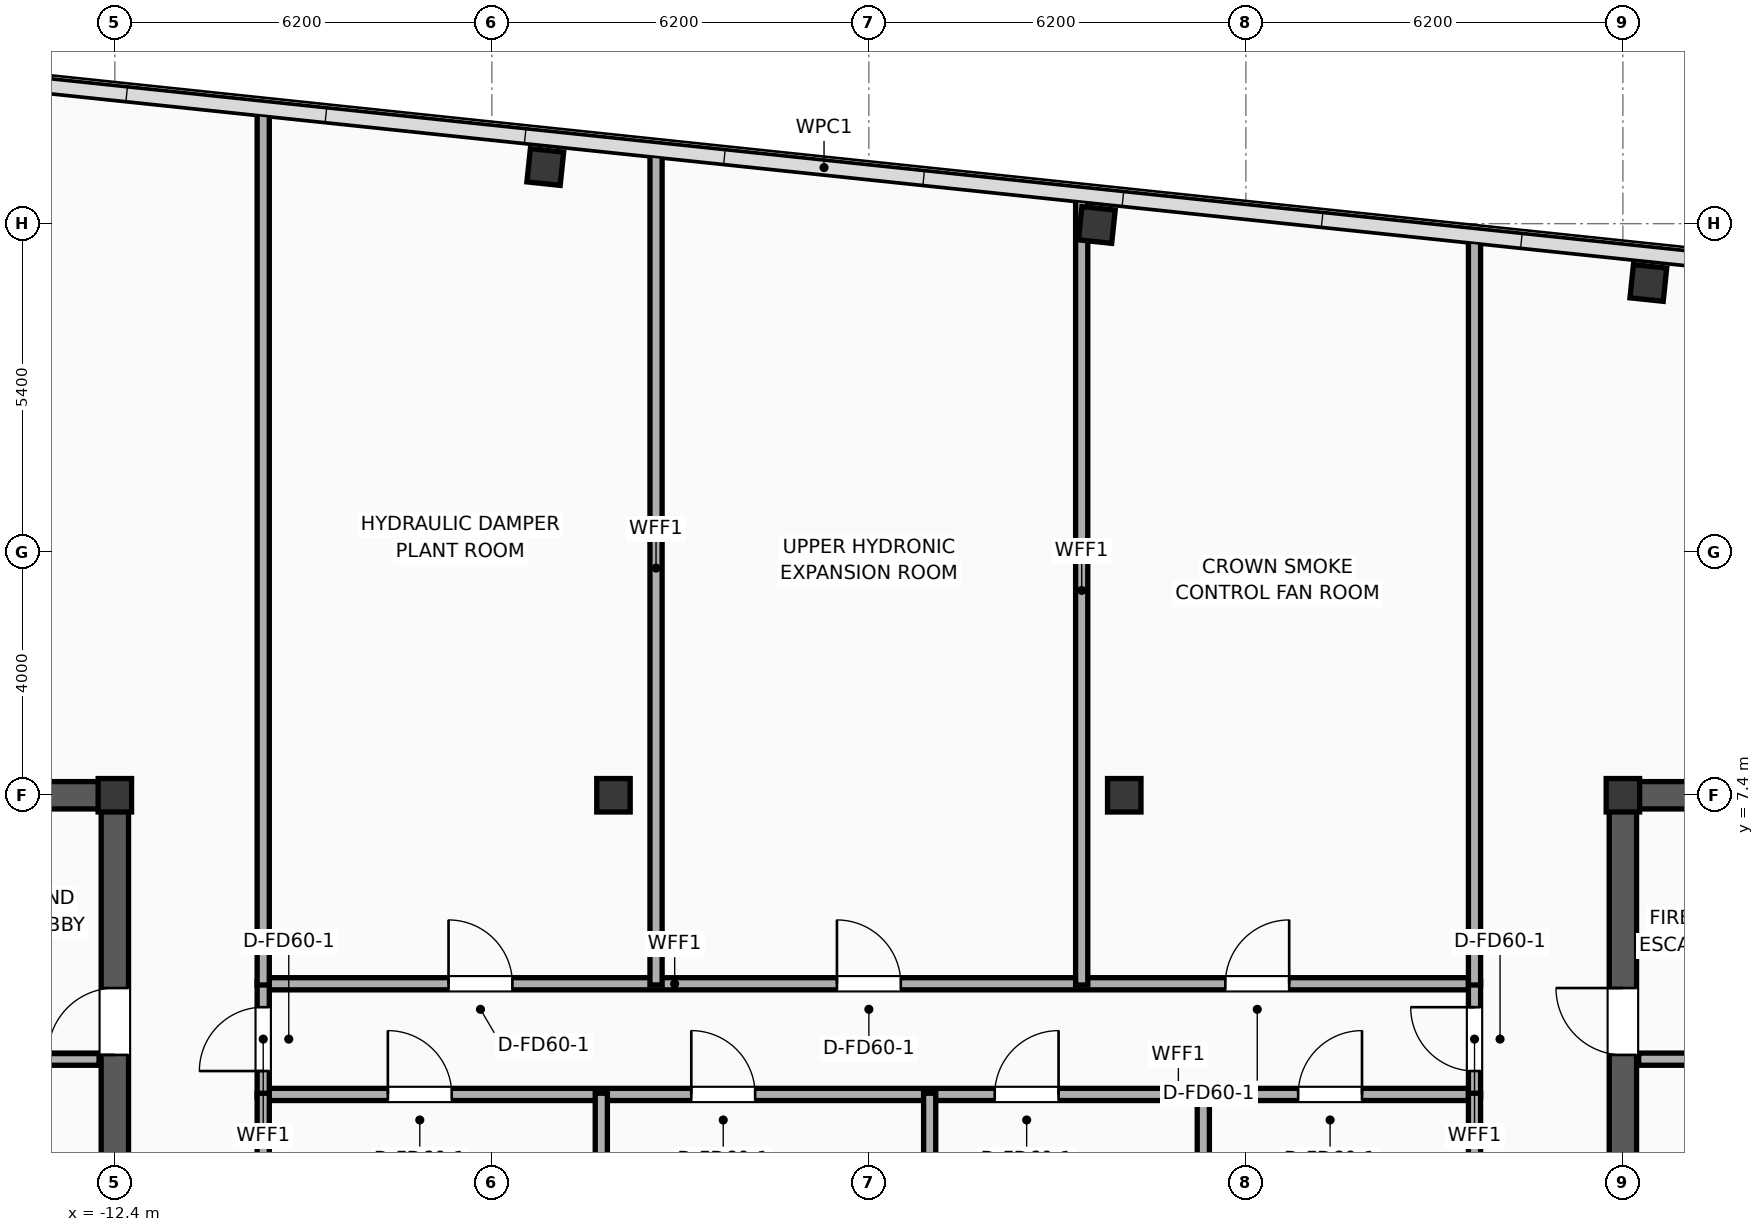
"""IFC4 building model, lengths in metres.
Left out: names, types, materials, properties, quantities, classifications, styles, units other than length and angle.
Written with IfcOpenShell. Run it as: python <this file> out.ifc"""

import sys

from ifc_helpers import new_model, si_unit, direction, frame, frame_2d, origin, origin_2d, place, context, subcontext, project, spatial, rectangle, hollow_rectangle, extrude, element, fill, save


model = new_model("IFC4")
c1 = context("Model", 3, precision=1e-05, world=origin(), true_north=direction((0.0, 1.0)))
c2 = subcontext(c1, "Body", "Model", "MODEL_VIEW")
j1 = project(units=[si_unit("LENGTHUNIT", "METRE"), si_unit("PLANEANGLEUNIT", "RADIAN")], contexts=[c1])
p1 = place(None, origin())
s1 = spatial("IfcSite", under=j1, at=p1, CompositionType="ELEMENT")
p2 = place(p1, origin())
s2 = spatial("IfcBuilding", under=s1, at=p2, CompositionType="ELEMENT")
p3 = place(p2, frame((0.0, 0.0, 326.6)))
s3 = spatial("IfcBuildingStorey", under=s2, at=p3, CompositionType="ELEMENT", Elevation=326.6)
for number, where, z_axis, x_axis in (
    (1, (-12.4, 7.4, 0.0), (0.0, 0.0, 1.0), (1.0, 0.0, 0.0)),
    (2, (12.4, 7.4, 0.0), (0.0, 0.0, 1.0), (1.0, 0.0, 0.0)),
):
    element("IfcColumn", number, at=place(p3, frame(where, z_axis=z_axis, x_axis=x_axis)), inside=s3, PredefinedType="COLUMN", context=c2, shape_type="SweptSolid", body=[
        extrude(hollow_rectangle(XDim=0.55, YDim=0.55, WallThickness=0.022, at=origin_2d()), origin(), (0.0, 0.0, 1.0), 5.3),
    ])
p4 = place(p3, frame((-19.425, 7.4, 0.0), z_axis=(0.0, 0.0, 1.0), x_axis=(1.0, 0.0, 0.0)))
e3 = element("IfcWall", 3, at=p4, inside=s3, PredefinedType="SHEAR", context=c2, shape_type="SweptSolid", body=[
    extrude(rectangle(XDim=7.25, YDim=0.45, at=frame_2d((3.625, 0.0))), origin(), (0.0, 0.0, 1.0), 5.025),
])
p5 = place(p3, frame((-12.4, -7.4, 0.0), z_axis=(0.0, 0.0, 1.0), x_axis=(0.0, 1.0, 0.0)))
e4 = element("IfcWall", 4, at=p5, inside=s3, PredefinedType="SHEAR", context=c2, shape_type="SweptSolid", body=[
    extrude(rectangle(XDim=14.8, YDim=0.45, at=frame_2d((7.4, 0.0))), origin(), (0.0, 0.0, 1.0), 5.025),
])
p6 = place(p5, frame((10.53, 0.0, 0.0)))
e5 = element("IfcOpeningElement", 5, at=p6, cuts=e4, PredefinedType="OPENING", context=c2, shape_type="SweptSolid", body=[
    extrude(rectangle(XDim=1.1, YDim=2.05, at=frame_2d((0.55, 1.025))), frame((0.0, 0.235, 0.0), z_axis=(0.0, -1.0, 0.0), x_axis=(1.0, 0.0, 0.0)), (0.0, 0.0, 1.0), 0.47),
])
p7 = place(p5, frame((4.45, 0.0, 0.0)))
e6 = element("IfcOpeningElement", 6, at=p7, cuts=e4, PredefinedType="OPENING", context=c2, shape_type="SweptSolid", body=[
    extrude(rectangle(XDim=0.9, YDim=2.05, at=frame_2d((0.45, 1.025))), frame((0.0, 0.235, 0.0), z_axis=(0.0, -1.0, 0.0), x_axis=(1.0, 0.0, 0.0)), (0.0, 0.0, 1.0), 0.47),
])
p8 = place(p3, frame((12.175, 7.4, 0.0), z_axis=(0.0, 0.0, 1.0), x_axis=(1.0, 0.0, 0.0)))
e7 = element("IfcWall", 7, at=p8, inside=s3, PredefinedType="SHEAR", context=c2, shape_type="SweptSolid", body=[
    extrude(rectangle(XDim=7.25, YDim=0.45, at=frame_2d((3.625, 0.0))), origin(), (0.0, 0.0, 1.0), 5.025),
])
p9 = place(p3, frame((12.4, -7.4, 0.0), z_axis=(0.0, 0.0, 1.0), x_axis=(0.0, 1.0, 0.0)))
e8 = element("IfcWall", 8, at=p9, inside=s3, PredefinedType="SHEAR", context=c2, shape_type="SweptSolid", body=[
    extrude(rectangle(XDim=14.8, YDim=0.45, at=frame_2d((7.4, 0.0))), origin(), (0.0, 0.0, 1.0), 5.025),
])
p10 = place(p9, frame((10.53, 0.0, 0.0)))
e9 = element("IfcOpeningElement", 9, at=p10, cuts=e8, PredefinedType="OPENING", context=c2, shape_type="SweptSolid", body=[
    extrude(rectangle(XDim=1.1, YDim=2.05, at=frame_2d((0.55, 1.025))), frame((0.0, 0.235, 0.0), z_axis=(0.0, -1.0, 0.0), x_axis=(1.0, 0.0, 0.0)), (0.0, 0.0, 1.0), 0.47),
])
p11 = place(p9, frame((4.45, 0.0, 0.0)))
e10 = element("IfcOpeningElement", 10, at=p11, cuts=e8, PredefinedType="OPENING", context=c2, shape_type="SweptSolid", body=[
    extrude(rectangle(XDim=0.9, YDim=2.05, at=frame_2d((0.45, 1.025))), frame((0.0, 0.235, 0.0), z_axis=(0.0, -1.0, 0.0), x_axis=(1.0, 0.0, 0.0)), (0.0, 0.0, 1.0), 0.47),
])
for number, where, z_axis, x_axis in (
    (11, (-4.2, 7.4, 0.0), (0.0, 0.0, 1.0), (1.0, 0.0, 0.0)),
    (12, (4.2, 7.4, 0.0), (0.0, 0.0, 1.0), (1.0, 0.0, 0.0)),
    (13, (12.819, 15.825, 0.0), (0.0, 0.0, 1.0), (0.995, -0.105, 0.0)),
    (14, (3.749, 16.778, 0.0), (0.0, 0.0, 1.0), (0.995, -0.105, 0.0)),
    (15, (-5.322, 17.732, 0.0), (0.0, 0.0, 1.0), (0.995, -0.105, 0.0)),
):
    element("IfcColumn", number, at=place(p3, frame(where, z_axis=z_axis, x_axis=x_axis)), inside=s3, PredefinedType="COLUMN", context=c2, shape_type="SweptSolid", body=[
        extrude(hollow_rectangle(XDim=0.55, YDim=0.55, WallThickness=0.022, at=origin_2d()), origin(), (0.0, 0.0, 1.0), 5.3),
    ])
p12 = place(p3, frame((-23.395, 20.104, 0.0), z_axis=(0.0, 0.0, 1.0), x_axis=(0.994522116558, -0.104526358762, 0.0)))
e16 = element("IfcWall", 16, at=p12, inside=s3, PredefinedType="PARAPET", context=c2, shape_type="SweptSolid", body=[
    extrude(rectangle(XDim=45.564, YDim=0.22, at=frame_2d((22.782, 0.0))), origin(), (0.0, 0.0, 1.0), 1.2),
])
for number, where, z_axis, x_axis in (
    (17, (-15.82, 3.06, 0.0), (0.0, 0.0, 1.0), (1.0, 0.0, 0.0)),
    (18, (12.66, 3.06, 0.0), (0.0, 0.0, 1.0), (1.0, 0.0, 0.0)),
):
    element("IfcWall", number, at=place(p3, frame(where, z_axis=z_axis, x_axis=x_axis)), inside=s3, PredefinedType="PARTITIONING", context=c2, shape_type="SweptSolid", body=[
        extrude(rectangle(XDim=3.16, YDim=0.2, at=frame_2d((1.58, 0.0))), origin(), (0.0, 0.0, 1.0), 5.025),
    ])
p13 = place(p3, frame((-9.98, 2.48, 0.0), z_axis=(0.0, 0.0, 1.0), x_axis=(1.0, 0.0, 0.0)))
e19 = element("IfcWall", 19, at=p13, inside=s3, PredefinedType="PARTITIONING", context=c2, shape_type="SweptSolid", body=[
    extrude(rectangle(XDim=19.96, YDim=0.2, at=frame_2d((9.98, 0.0))), origin(), (0.0, 0.0, 1.0), 4.595),
])
p14 = place(p13, frame((2.07, 0.0, 0.0)))
e20 = element("IfcOpeningElement", 20, at=p14, cuts=e19, PredefinedType="OPENING", context=c2, shape_type="SweptSolid", body=[
    extrude(rectangle(XDim=1.05, YDim=2.05, at=frame_2d((0.525, 1.025))), frame((0.0, 0.11, 0.0), z_axis=(0.0, -1.0, 0.0), x_axis=(1.0, 0.0, 0.0)), (0.0, 0.0, 1.0), 0.22),
])
p15 = place(p13, frame((7.06, 0.0, 0.0)))
e21 = element("IfcOpeningElement", 21, at=p15, cuts=e19, PredefinedType="OPENING", context=c2, shape_type="SweptSolid", body=[
    extrude(rectangle(XDim=1.05, YDim=2.05, at=frame_2d((0.525, 1.025))), frame((0.0, 0.11, 0.0), z_axis=(0.0, -1.0, 0.0), x_axis=(1.0, 0.0, 0.0)), (0.0, 0.0, 1.0), 0.22),
])
p16 = place(p13, frame((12.05, 0.0, 0.0)))
e22 = element("IfcOpeningElement", 22, at=p16, cuts=e19, PredefinedType="OPENING", context=c2, shape_type="SweptSolid", body=[
    extrude(rectangle(XDim=1.05, YDim=2.05, at=frame_2d((0.525, 1.025))), frame((0.0, 0.11, 0.0), z_axis=(0.0, -1.0, 0.0), x_axis=(1.0, 0.0, 0.0)), (0.0, 0.0, 1.0), 0.22),
])
p17 = place(p13, frame((17.04, 0.0, 0.0)))
e23 = element("IfcOpeningElement", 23, at=p17, cuts=e19, PredefinedType="OPENING", context=c2, shape_type="SweptSolid", body=[
    extrude(rectangle(XDim=1.05, YDim=2.05, at=frame_2d((0.525, 1.025))), frame((0.0, 0.11, 0.0), z_axis=(0.0, -1.0, 0.0), x_axis=(1.0, 0.0, 0.0)), (0.0, 0.0, 1.0), 0.22),
])
p18 = place(p3, frame((-9.98, 4.3, 0.0), z_axis=(0.0, 0.0, 1.0), x_axis=(1.0, 0.0, 0.0)))
e24 = element("IfcWall", 24, at=p18, inside=s3, PredefinedType="PARTITIONING", context=c2, shape_type="SweptSolid", body=[
    extrude(rectangle(XDim=19.96, YDim=0.2, at=frame_2d((9.98, 0.0))), origin(), (0.0, 0.0, 1.0), 5.025),
])
p19 = place(p18, frame((3.068, 0.0, 0.0)))
e25 = element("IfcOpeningElement", 25, at=p19, cuts=e24, PredefinedType="OPENING", context=c2, shape_type="SweptSolid", body=[
    extrude(rectangle(XDim=1.05, YDim=2.05, at=frame_2d((0.525, 1.025))), frame((0.0, 0.11, 0.0), z_axis=(0.0, -1.0, 0.0), x_axis=(1.0, 0.0, 0.0)), (0.0, 0.0, 1.0), 0.22),
])
p20 = place(p18, frame((9.455, 0.0, 0.0)))
e26 = element("IfcOpeningElement", 26, at=p20, cuts=e24, PredefinedType="OPENING", context=c2, shape_type="SweptSolid", body=[
    extrude(rectangle(XDim=1.05, YDim=2.05, at=frame_2d((0.525, 1.025))), frame((0.0, 0.11, 0.0), z_axis=(0.0, -1.0, 0.0), x_axis=(1.0, 0.0, 0.0)), (0.0, 0.0, 1.0), 0.22),
])
p21 = place(p18, frame((15.842, 0.0, 0.0)))
e27 = element("IfcOpeningElement", 27, at=p21, cuts=e24, PredefinedType="OPENING", context=c2, shape_type="SweptSolid", body=[
    extrude(rectangle(XDim=1.05, YDim=2.05, at=frame_2d((0.525, 1.025))), frame((0.0, 0.11, 0.0), z_axis=(0.0, -1.0, 0.0), x_axis=(1.0, 0.0, 0.0)), (0.0, 0.0, 1.0), 0.22),
])
p22 = place(p3, frame((-9.96, 2.44, 0.0), z_axis=(0.0, 0.0, 1.0), x_axis=(0.0, 1.0, 0.0)))
e28 = element("IfcWall", 28, at=p22, inside=s3, PredefinedType="PARTITIONING", context=c2, shape_type="SweptSolid", body=[
    extrude(rectangle(XDim=1.9, YDim=0.2, at=frame_2d((0.95, 0.0))), origin(), (0.0, 0.0, 1.0), 5.025),
])
p23 = place(p22, frame((0.425, 0.0, 0.0)))
e29 = element("IfcOpeningElement", 29, at=p23, cuts=e28, PredefinedType="OPENING", context=c2, shape_type="SweptSolid", body=[
    extrude(rectangle(XDim=1.05, YDim=2.05, at=frame_2d((0.525, 1.025))), frame((0.0, 0.11, 0.0), z_axis=(0.0, -1.0, 0.0), x_axis=(1.0, 0.0, 0.0)), (0.0, 0.0, 1.0), 0.22),
])
p24 = place(p3, frame((9.96, 2.44, 0.0), z_axis=(0.0, 0.0, 1.0), x_axis=(0.0, 1.0, 0.0)))
e30 = element("IfcWall", 30, at=p24, inside=s3, PredefinedType="PARTITIONING", context=c2, shape_type="SweptSolid", body=[
    extrude(rectangle(XDim=1.9, YDim=0.2, at=frame_2d((0.95, 0.0))), origin(), (0.0, 0.0, 1.0), 5.025),
])
p25 = place(p24, frame((0.425, 0.0, 0.0)))
e31 = element("IfcOpeningElement", 31, at=p25, cuts=e30, PredefinedType="OPENING", context=c2, shape_type="SweptSolid", body=[
    extrude(rectangle(XDim=1.05, YDim=2.05, at=frame_2d((0.525, 1.025))), frame((0.0, 0.11, 0.0), z_axis=(0.0, -1.0, 0.0), x_axis=(1.0, 0.0, 0.0)), (0.0, 0.0, 1.0), 0.22),
])
p26 = place(p3, frame((-9.96, -17.125, 0.0), z_axis=(0.0, 0.0, 1.0), x_axis=(0.0, 1.0, 0.0)))
e32 = element("IfcWall", 32, at=p26, inside=s3, PredefinedType="PARTITIONING", context=c2, shape_type="SweptSolid", body=[
    extrude(rectangle(XDim=19.625, YDim=0.2, at=frame_2d((9.812, 0.0))), origin(), (0.0, 0.0, 1.0), 4.465),
])
p27 = place(p3, frame((-9.96, 4.28, 0.0), z_axis=(0.0, 0.0, 1.0), x_axis=(0.0, 1.0, 0.0)))
e33 = element("IfcWall", 33, at=p27, inside=s3, PredefinedType="PARTITIONING", context=c2, shape_type="SweptSolid", body=[
    extrude(rectangle(XDim=14.392, YDim=0.2, at=frame_2d((7.196, 0.0))), origin(), (0.0, 0.0, 1.0), 5.025),
])
p28 = place(p3, frame((9.96, -19.218, 0.0), z_axis=(0.0, 0.0, 1.0), x_axis=(0.0, 1.0, 0.0)))
e34 = element("IfcWall", 34, at=p28, inside=s3, PredefinedType="PARTITIONING", context=c2, shape_type="SweptSolid", body=[
    extrude(rectangle(XDim=21.718, YDim=0.2, at=frame_2d((10.859, 0.0))), origin(), (0.0, 0.0, 1.0), 4.465),
])
p29 = place(p3, frame((9.96, 4.28, 0.0), z_axis=(0.0, 0.0, 1.0), x_axis=(0.0, 1.0, 0.0)))
e35 = element("IfcWall", 35, at=p29, inside=s3, PredefinedType="PARTITIONING", context=c2, shape_type="SweptSolid", body=[
    extrude(rectangle(XDim=12.298, YDim=0.2, at=frame_2d((6.149, 0.0))), origin(), (0.0, 0.0, 1.0), 5.025),
])
p30 = place(p3, frame((-4.4, -17.709, 0.0), z_axis=(0.0, 0.0, 1.0), x_axis=(0.0, 1.0, 0.0)))
e36 = element("IfcWall", 36, at=p30, inside=s3, PredefinedType="PARTITIONING", context=c2, shape_type="SweptSolid", body=[
    extrude(rectangle(XDim=20.209, YDim=0.2, at=frame_2d((10.104, 0.0))), origin(), (0.0, 0.0, 1.0), 4.465),
])
p31 = place(p3, frame((1.0, -18.276, 0.0), z_axis=(0.0, 0.0, 1.0), x_axis=(0.0, 1.0, 0.0)))
e37 = element("IfcWall", 37, at=p31, inside=s3, PredefinedType="PARTITIONING", context=c2, shape_type="SweptSolid", body=[
    extrude(rectangle(XDim=20.776, YDim=0.2, at=frame_2d((10.388, 0.0))), origin(), (0.0, 0.0, 1.0), 4.465),
])
p32 = place(p3, frame((5.5, -18.75, 0.0), z_axis=(0.0, 0.0, 1.0), x_axis=(0.0, 1.0, 0.0)))
e38 = element("IfcWall", 38, at=p32, inside=s3, PredefinedType="PARTITIONING", context=c2, shape_type="SweptSolid", body=[
    extrude(rectangle(XDim=21.25, YDim=0.2, at=frame_2d((10.625, 0.0))), origin(), (0.0, 0.0, 1.0), 5.025),
])
p33 = place(p3, frame((-3.5, 4.28, 0.0), z_axis=(0.0, 0.0, 1.0), x_axis=(0.0, 1.0, 0.0)))
e39 = element("IfcWall", 39, at=p33, inside=s3, PredefinedType="PARTITIONING", context=c2, shape_type="SweptSolid", body=[
    extrude(rectangle(XDim=13.713, YDim=0.2, at=frame_2d((6.856, 0.0))), origin(), (0.0, 0.0, 1.0), 5.025),
])
p34 = place(p3, frame((3.5, 4.28, 0.0), z_axis=(0.0, 0.0, 1.0), x_axis=(0.0, 1.0, 0.0)))
e40 = element("IfcWall", 40, at=p34, inside=s3, PredefinedType="PARTITIONING", context=c2, shape_type="SweptSolid", body=[
    extrude(rectangle(XDim=12.977, YDim=0.2, at=frame_2d((6.488, 0.0))), origin(), (0.0, 0.0, 1.0), 5.025),
])
p35 = place(p14, origin())
e41 = element("IfcDoor", 41, at=p35, inside=s3, OperationType="SINGLE_SWING_LEFT", PredefinedType="DOOR", context=c2, shape_type="SweptSolid", body=[
    extrude(rectangle(XDim=1.05, YDim=2.05, at=frame_2d((0.525, 1.025))), frame((0.0, 0.025, 0.0), z_axis=(0.0, -1.0, 0.0), x_axis=(1.0, 0.0, 0.0)), (0.0, 0.0, 1.0), 0.05),
])
fill(e20, e41)
p36 = place(p15, origin())
e42 = element("IfcDoor", 42, at=p36, inside=s3, OperationType="SINGLE_SWING_LEFT", PredefinedType="DOOR", context=c2, shape_type="SweptSolid", body=[
    extrude(rectangle(XDim=1.05, YDim=2.05, at=frame_2d((0.525, 1.025))), frame((0.0, 0.025, 0.0), z_axis=(0.0, -1.0, 0.0), x_axis=(1.0, 0.0, 0.0)), (0.0, 0.0, 1.0), 0.05),
])
fill(e21, e42)
p37 = place(p16, origin())
e43 = element("IfcDoor", 43, at=p37, inside=s3, OperationType="SINGLE_SWING_RIGHT", PredefinedType="DOOR", context=c2, shape_type="SweptSolid", body=[
    extrude(rectangle(XDim=1.05, YDim=2.05, at=frame_2d((0.525, 1.025))), frame((0.0, 0.025, 0.0), z_axis=(0.0, -1.0, 0.0), x_axis=(1.0, 0.0, 0.0)), (0.0, 0.0, 1.0), 0.05),
])
fill(e22, e43)
p38 = place(p17, origin())
e44 = element("IfcDoor", 44, at=p38, inside=s3, OperationType="SINGLE_SWING_RIGHT", PredefinedType="DOOR", context=c2, shape_type="SweptSolid", body=[
    extrude(rectangle(XDim=1.05, YDim=2.05, at=frame_2d((0.525, 1.025))), frame((0.0, 0.025, 0.0), z_axis=(0.0, -1.0, 0.0), x_axis=(1.0, 0.0, 0.0)), (0.0, 0.0, 1.0), 0.05),
])
fill(e23, e44)
p39 = place(p19, origin())
e45 = element("IfcDoor", 45, at=p39, inside=s3, OperationType="SINGLE_SWING_LEFT", PredefinedType="DOOR", context=c2, shape_type="SweptSolid", body=[
    extrude(rectangle(XDim=1.05, YDim=2.05, at=frame_2d((0.525, 1.025))), frame((0.0, 0.025, 0.0), z_axis=(0.0, -1.0, 0.0), x_axis=(1.0, 0.0, 0.0)), (0.0, 0.0, 1.0), 0.05),
])
fill(e25, e45)
p40 = place(p20, origin())
e46 = element("IfcDoor", 46, at=p40, inside=s3, OperationType="SINGLE_SWING_LEFT", PredefinedType="DOOR", context=c2, shape_type="SweptSolid", body=[
    extrude(rectangle(XDim=1.05, YDim=2.05, at=frame_2d((0.525, 1.025))), frame((0.0, 0.025, 0.0), z_axis=(0.0, -1.0, 0.0), x_axis=(1.0, 0.0, 0.0)), (0.0, 0.0, 1.0), 0.05),
])
fill(e26, e46)
p41 = place(p21, origin())
e47 = element("IfcDoor", 47, at=p41, inside=s3, OperationType="SINGLE_SWING_RIGHT", PredefinedType="DOOR", context=c2, shape_type="SweptSolid", body=[
    extrude(rectangle(XDim=1.05, YDim=2.05, at=frame_2d((0.525, 1.025))), frame((0.0, 0.025, 0.0), z_axis=(0.0, -1.0, 0.0), x_axis=(1.0, 0.0, 0.0)), (0.0, 0.0, 1.0), 0.05),
])
fill(e27, e47)
p42 = place(p23, origin())
e48 = element("IfcDoor", 48, at=p42, inside=s3, OperationType="SINGLE_SWING_LEFT", PredefinedType="DOOR", context=c2, shape_type="SweptSolid", body=[
    extrude(rectangle(XDim=1.05, YDim=2.05, at=frame_2d((0.525, 1.025))), frame((0.0, 0.025, 0.0), z_axis=(0.0, -1.0, 0.0), x_axis=(1.0, 0.0, 0.0)), (0.0, 0.0, 1.0), 0.05),
])
fill(e29, e48)
p43 = place(p25, origin())
e49 = element("IfcDoor", 49, at=p43, inside=s3, OperationType="SINGLE_SWING_RIGHT", PredefinedType="DOOR", context=c2, shape_type="SweptSolid", body=[
    extrude(rectangle(XDim=1.05, YDim=2.05, at=frame_2d((0.525, 1.025))), frame((0.0, 0.025, 0.0), z_axis=(0.0, -1.0, 0.0), x_axis=(1.0, 0.0, 0.0)), (0.0, 0.0, 1.0), 0.05),
])
fill(e31, e49)
p44 = place(p6, origin())
e50 = element("IfcDoor", 50, at=p44, inside=s3, OperationType="SINGLE_SWING_LEFT", PredefinedType="DOOR", context=c2, shape_type="SweptSolid", body=[
    extrude(rectangle(XDim=1.1, YDim=2.05, at=frame_2d((0.55, 1.025))), frame((0.0, 0.025, 0.0), z_axis=(0.0, -1.0, 0.0), x_axis=(1.0, 0.0, 0.0)), (0.0, 0.0, 1.0), 0.05),
])
fill(e5, e50)
p45 = place(p10, origin())
e51 = element("IfcDoor", 51, at=p45, inside=s3, OperationType="SINGLE_SWING_RIGHT", PredefinedType="DOOR", context=c2, shape_type="SweptSolid", body=[
    extrude(rectangle(XDim=1.1, YDim=2.05, at=frame_2d((0.55, 1.025))), frame((0.0, 0.025, 0.0), z_axis=(0.0, -1.0, 0.0), x_axis=(1.0, 0.0, 0.0)), (0.0, 0.0, 1.0), 0.05),
])
fill(e9, e51)
save(model, sys.argv[1])
